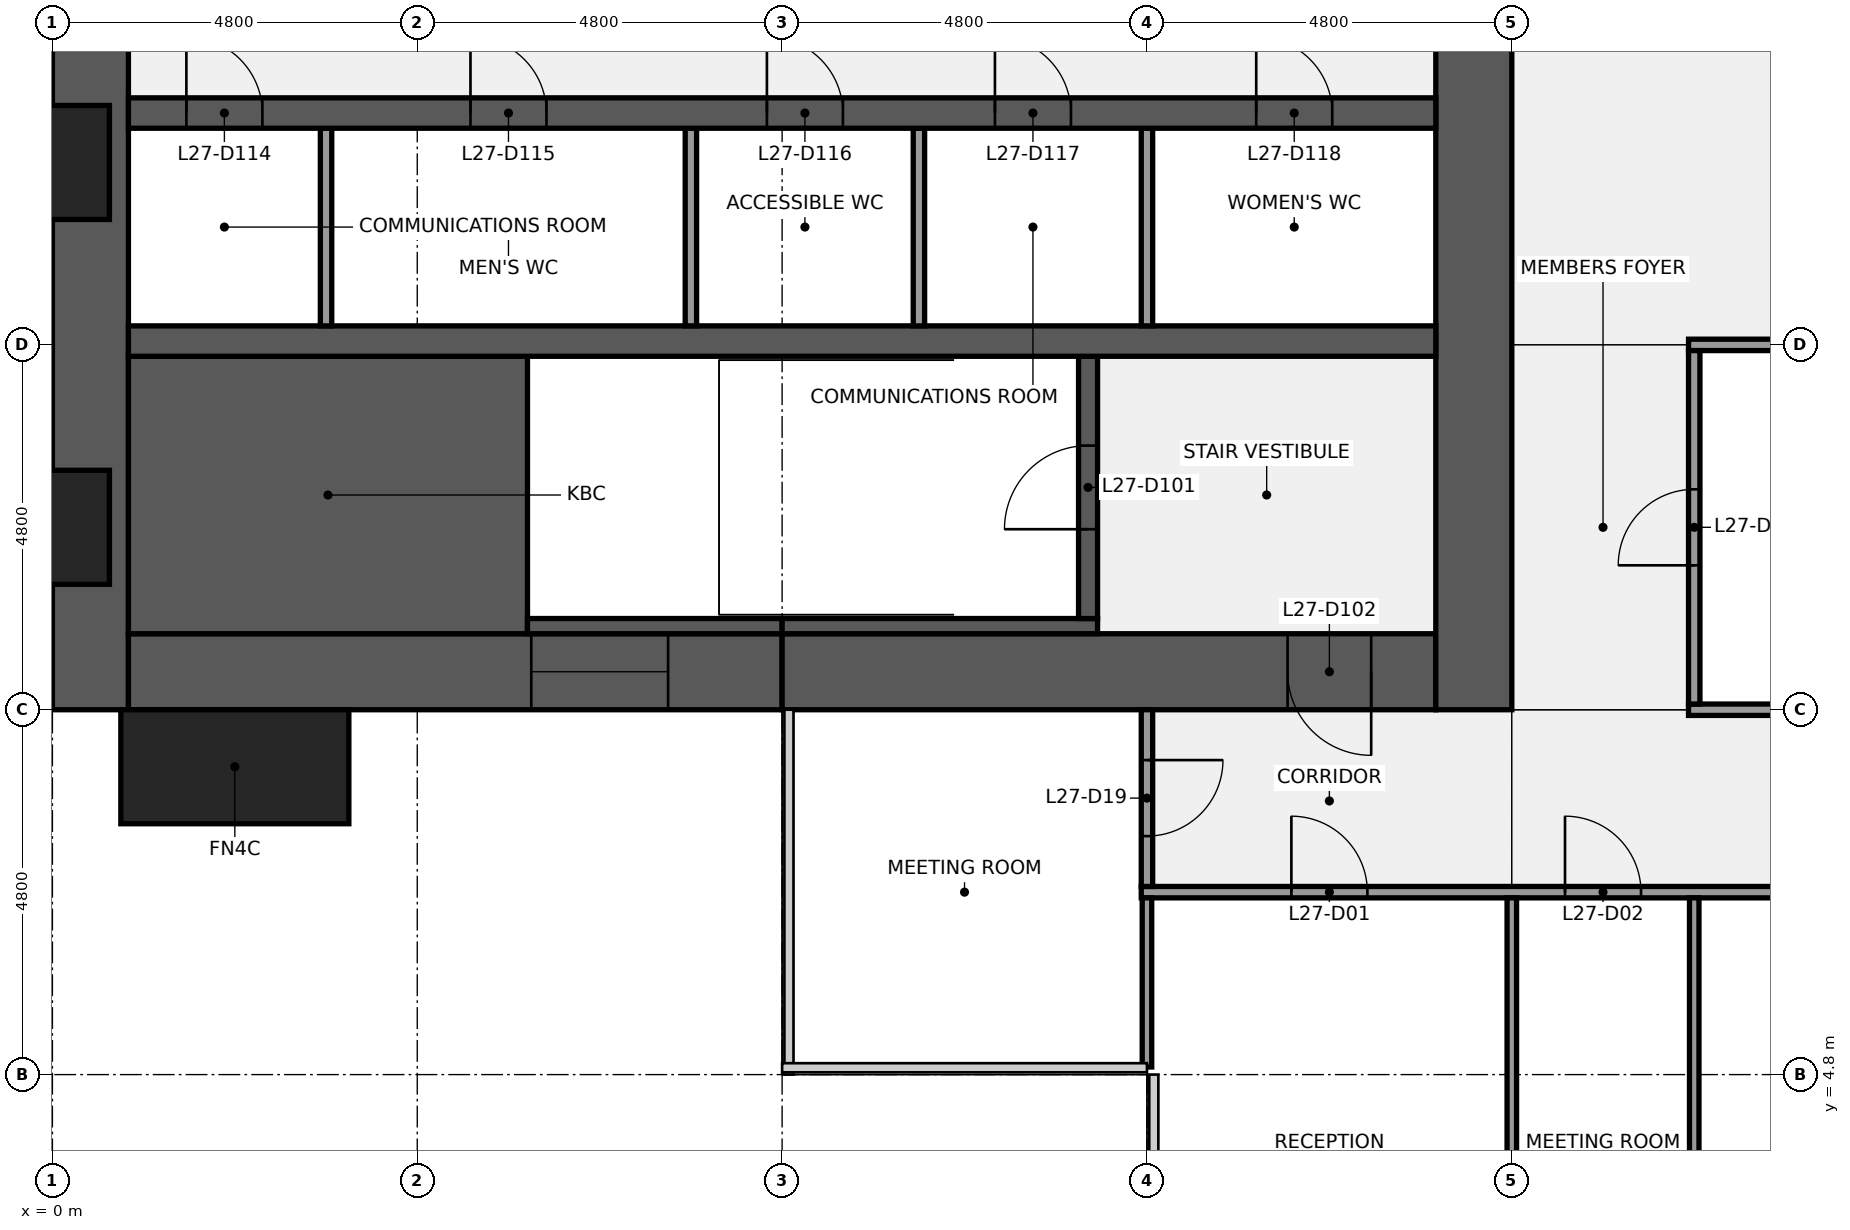
"""IFC4 building model, lengths in metres.
Left out: names, types, materials, properties, quantities, classifications, styles, units other than length and angle.
Written with IfcOpenShell. Run it as: python <this file> out.ifc"""

import sys

from ifc_helpers import new_model, si_unit, direction, frame, frame_2d, origin, origin_2d, place, context, subcontext, project, spatial, rectangle, extrude, element, fill, save


model = new_model("IFC4")
c1 = context("Model", 3, precision=1e-05, world=origin(), true_north=direction((0.0, 1.0)))
c2 = subcontext(c1, "Body", "Model", "MODEL_VIEW")
j1 = project(units=[si_unit("LENGTHUNIT", "METRE"), si_unit("PLANEANGLEUNIT", "RADIAN")], contexts=[c1])
p1 = place(None, origin())
s1 = spatial("IfcSite", under=j1, at=p1, CompositionType="ELEMENT")
p2 = place(p1, origin())
s2 = spatial("IfcBuilding", under=s1, at=p2, CompositionType="ELEMENT")
p3 = place(p2, frame((0.0, 0.0, 128.1)))
s3 = spatial("IfcBuildingStorey", under=s2, at=p3, CompositionType="ELEMENT", Elevation=128.1)
p4 = place(p3, frame((0.5, 9.6, 0.0), z_axis=(0.0, 0.0, 1.0), x_axis=(0.0, 1.0, 0.0)))
e1 = element("IfcWall", 1, at=p4, inside=s3, PredefinedType="SHEAR", context=c2, shape_type="SweptSolid", body=[
    extrude(rectangle(XDim=28.8, YDim=1.0, at=frame_2d((14.4, 0.0))), origin(), (0.0, 0.0, 1.0), 3.84),
])
p5 = place(p4, frame((8.85, 0.0, 0.9)))
e2 = element("IfcOpeningElement", 2, at=p5, cuts=e1, PredefinedType="OPENING", context=c2, shape_type="SweptSolid", body=[
    extrude(rectangle(XDim=1.5, YDim=1.5, at=frame_2d((0.75, 0.75))), frame((0.0, 0.51, 0.0), z_axis=(0.0, -1.0, 0.0), x_axis=(1.0, 0.0, 0.0)), (0.0, 0.0, 1.0), 1.02),
])
p6 = place(p4, frame((18.45, 0.0, 0.9)))
e3 = element("IfcOpeningElement", 3, at=p6, cuts=e1, PredefinedType="OPENING", context=c2, shape_type="SweptSolid", body=[
    extrude(rectangle(XDim=1.5, YDim=1.5, at=frame_2d((0.75, 0.75))), frame((0.0, 0.51, 0.0), z_axis=(0.0, -1.0, 0.0), x_axis=(1.0, 0.0, 0.0)), (0.0, 0.0, 1.0), 1.02),
])
p7 = place(p3, frame((9.6, 10.1, 0.0), z_axis=(0.0, 0.0, 1.0), x_axis=(-1.0, 0.0, 0.0)))
e4 = element("IfcWall", 4, at=p7, inside=s3, PredefinedType="SHEAR", context=c2, shape_type="SweptSolid", body=[
    extrude(rectangle(XDim=8.6, YDim=1.0, at=frame_2d((4.3, 0.0))), origin(), (0.0, 0.0, 1.0), 3.84),
])
p8 = place(p7, frame((1.5, 0.0, 0.9)))
e5 = element("IfcOpeningElement", 5, at=p8, cuts=e4, PredefinedType="OPENING", context=c2, shape_type="SweptSolid", body=[
    extrude(rectangle(XDim=1.8, YDim=1.5, at=frame_2d((0.9, 0.75))), frame((0.0, 0.51, 0.0), z_axis=(0.0, -1.0, 0.0), x_axis=(1.0, 0.0, 0.0)), (0.0, 0.0, 1.0), 1.02),
])
p9 = place(p3, frame((18.2, 10.1, 0.0), z_axis=(0.0, 0.0, 1.0), x_axis=(-1.0, 0.0, 0.0)))
e6 = element("IfcWall", 6, at=p9, inside=s3, PredefinedType="SHEAR", context=c2, shape_type="SweptSolid", body=[
    extrude(rectangle(XDim=8.6, YDim=1.0, at=frame_2d((4.3, 0.0))), origin(), (0.0, 0.0, 1.0), 3.84),
])
p10 = place(p9, frame((0.85, 0.0, 0.0)))
e7 = element("IfcOpeningElement", 7, at=p10, cuts=e6, PredefinedType="OPENING", context=c2, shape_type="SweptSolid", body=[
    extrude(rectangle(XDim=1.1, YDim=2.1, at=frame_2d((0.55, 1.05))), frame((0.0, 0.51, 0.0), z_axis=(0.0, -1.0, 0.0), x_axis=(1.0, 0.0, 0.0)), (0.0, 0.0, 1.0), 1.02),
])
p11 = place(p3, frame((18.7, 38.4, 0.0), z_axis=(0.0, 0.0, 1.0), x_axis=(0.0, -1.0, 0.0)))
e8 = element("IfcWall", 8, at=p11, inside=s3, PredefinedType="SHEAR", context=c2, shape_type="SweptSolid", body=[
    extrude(rectangle(XDim=28.8, YDim=1.0, at=frame_2d((14.4, 0.0))), origin(), (0.0, 0.0, 1.0), 3.84),
])
p12 = place(p11, frame((18.3, 0.0, 0.0)))
e9 = element("IfcOpeningElement", 9, at=p12, cuts=e8, PredefinedType="OPENING", context=c2, shape_type="SweptSolid", body=[
    extrude(rectangle(XDim=1.8, YDim=2.1, at=frame_2d((0.9, 1.05))), frame((0.0, 0.51, 0.0), z_axis=(0.0, -1.0, 0.0), x_axis=(1.0, 0.0, 0.0)), (0.0, 0.0, 1.0), 1.02),
])
p13 = place(p11, frame((8.7, 0.0, 0.0)))
e10 = element("IfcOpeningElement", 10, at=p13, cuts=e8, PredefinedType="OPENING", context=c2, shape_type="SweptSolid", body=[
    extrude(rectangle(XDim=1.8, YDim=2.1, at=frame_2d((0.9, 1.05))), frame((0.0, 0.51, 0.0), z_axis=(0.0, -1.0, 0.0), x_axis=(1.0, 0.0, 0.0)), (0.0, 0.0, 1.0), 1.02),
])
p14 = place(p3, frame((1.0, 12.425, 0.0), z_axis=(0.0, 0.0, 1.0), x_axis=(1.0, 0.0, 0.0)))
e11 = element("IfcWall", 11, at=p14, inside=s3, PredefinedType="SHEAR", context=c2, shape_type="SweptSolid", body=[
    extrude(rectangle(XDim=5.25, YDim=3.65, at=frame_2d((2.625, 0.0))), origin(), (0.0, 0.0, 1.0), 3.84),
])
p15 = place(p3, frame((6.25, 10.7, 0.0), z_axis=(0.0, 0.0, 1.0), x_axis=(1.0, 0.0, 0.0)))
e12 = element("IfcWall", 12, at=p15, inside=s3, PredefinedType="SHEAR", context=c2, shape_type="SweptSolid", body=[
    extrude(rectangle(XDim=3.35, YDim=0.2, at=frame_2d((1.675, 0.0))), origin(), (0.0, 0.0, 1.0), 3.84),
])
p16 = place(p3, frame((9.6, 10.7, 0.0), z_axis=(0.0, 0.0, 1.0), x_axis=(1.0, 0.0, 0.0)))
e13 = element("IfcWall", 13, at=p16, inside=s3, PredefinedType="SHEAR", context=c2, shape_type="SweptSolid", body=[
    extrude(rectangle(XDim=4.15, YDim=0.2, at=frame_2d((2.075, 0.0))), origin(), (0.0, 0.0, 1.0), 3.84),
])
p17 = place(p3, frame((13.625, 10.8, 0.0), z_axis=(0.0, 0.0, 1.0), x_axis=(0.0, 1.0, 0.0)))
e14 = element("IfcWall", 14, at=p17, inside=s3, PredefinedType="SHEAR", context=c2, shape_type="SweptSolid", body=[
    extrude(rectangle(XDim=3.45, YDim=0.25, at=frame_2d((1.725, 0.0))), origin(), (0.0, 0.0, 1.0), 3.84),
])
p18 = place(p17, frame((1.175, 0.0, 0.0)))
e15 = element("IfcOpeningElement", 15, at=p18, cuts=e14, PredefinedType="OPENING", context=c2, shape_type="SweptSolid", body=[
    extrude(rectangle(XDim=1.1, YDim=2.1, at=frame_2d((0.55, 1.05))), frame((0.0, 0.135, 0.0), z_axis=(0.0, -1.0, 0.0), x_axis=(1.0, 0.0, 0.0)), (0.0, 0.0, 1.0), 0.27),
])
p19 = place(p3, frame((1.0, 14.45, 0.0), z_axis=(0.0, 0.0, 1.0), x_axis=(1.0, 0.0, 0.0)))
e16 = element("IfcWall", 16, at=p19, inside=s3, PredefinedType="SHEAR", context=c2, shape_type="SweptSolid", body=[
    extrude(rectangle(XDim=17.2, YDim=0.4, at=frame_2d((8.6, 0.0))), origin(), (0.0, 0.0, 1.0), 3.84),
])
for number, where, z_axis, x_axis in (
    (17, (3.6, 14.65, 0.0), (0.0, 0.0, 1.0), (0.0, 1.0, 0.0)),
    (18, (8.4, 14.65, 0.0), (0.0, 0.0, 1.0), (0.0, 1.0, 0.0)),
    (19, (11.4, 14.65, 0.0), (0.0, 0.0, 1.0), (0.0, 1.0, 0.0)),
    (20, (14.4, 14.65, 0.0), (0.0, 0.0, 1.0), (0.0, 1.0, 0.0)),
):
    element("IfcWall", number, at=place(p3, frame(where, z_axis=z_axis, x_axis=x_axis)), inside=s3, PredefinedType="PARTITIONING", context=c2, shape_type="SweptSolid", body=[
        extrude(rectangle(XDim=2.6, YDim=0.15, at=frame_2d((1.3, 0.0))), origin(), (0.0, 0.0, 1.0), 3.84),
    ])
p20 = place(p3, frame((1.0, 17.45, 0.0), z_axis=(0.0, 0.0, 1.0), x_axis=(1.0, 0.0, 0.0)))
e21 = element("IfcWall", 21, at=p20, inside=s3, PredefinedType="SHEAR", context=c2, shape_type="SweptSolid", body=[
    extrude(rectangle(XDim=17.2, YDim=0.4, at=frame_2d((8.6, 0.0))), origin(), (0.0, 0.0, 1.0), 3.84),
])
p21 = place(p20, frame((0.762, 0.0, 0.0)))
e22 = element("IfcOpeningElement", 22, at=p21, cuts=e21, PredefinedType="OPENING", context=c2, shape_type="SweptSolid", body=[
    extrude(rectangle(XDim=1.0, YDim=2.1, at=frame_2d((0.5, 1.05))), frame((0.0, 0.21, 0.0), z_axis=(0.0, -1.0, 0.0), x_axis=(1.0, 0.0, 0.0)), (0.0, 0.0, 1.0), 0.42),
])
p22 = place(p20, frame((4.5, 0.0, 0.0)))
e23 = element("IfcOpeningElement", 23, at=p22, cuts=e21, PredefinedType="OPENING", context=c2, shape_type="SweptSolid", body=[
    extrude(rectangle(XDim=1.0, YDim=2.1, at=frame_2d((0.5, 1.05))), frame((0.0, 0.21, 0.0), z_axis=(0.0, -1.0, 0.0), x_axis=(1.0, 0.0, 0.0)), (0.0, 0.0, 1.0), 0.42),
])
p23 = place(p20, frame((8.4, 0.0, 0.0)))
e24 = element("IfcOpeningElement", 24, at=p23, cuts=e21, PredefinedType="OPENING", context=c2, shape_type="SweptSolid", body=[
    extrude(rectangle(XDim=1.0, YDim=2.1, at=frame_2d((0.5, 1.05))), frame((0.0, 0.21, 0.0), z_axis=(0.0, -1.0, 0.0), x_axis=(1.0, 0.0, 0.0)), (0.0, 0.0, 1.0), 0.42),
])
p24 = place(p20, frame((11.4, 0.0, 0.0)))
e25 = element("IfcOpeningElement", 25, at=p24, cuts=e21, PredefinedType="OPENING", context=c2, shape_type="SweptSolid", body=[
    extrude(rectangle(XDim=1.0, YDim=2.1, at=frame_2d((0.5, 1.05))), frame((0.0, 0.21, 0.0), z_axis=(0.0, -1.0, 0.0), x_axis=(1.0, 0.0, 0.0)), (0.0, 0.0, 1.0), 0.42),
])
p25 = place(p20, frame((14.837, 0.0, 0.0)))
e26 = element("IfcOpeningElement", 26, at=p25, cuts=e21, PredefinedType="OPENING", context=c2, shape_type="SweptSolid", body=[
    extrude(rectangle(XDim=1.0, YDim=2.1, at=frame_2d((0.5, 1.05))), frame((0.0, 0.21, 0.0), z_axis=(0.0, -1.0, 0.0), x_axis=(1.0, 0.0, 0.0)), (0.0, 0.0, 1.0), 0.42),
])
p26 = place(p3, frame((14.325, 7.2, 0.0), z_axis=(0.0, 0.0, 1.0), x_axis=(1.0, 0.0, 0.0)))
e27 = element("IfcWall", 27, at=p26, inside=s3, PredefinedType="PARTITIONING", context=c2, shape_type="SweptSolid", body=[
    extrude(rectangle(XDim=28.95, YDim=0.15, at=frame_2d((14.475, 0.0))), origin(), (0.0, 0.0, 1.0), 2.936),
])
p27 = place(p26, frame((1.975, 0.0, 0.0)))
e28 = element("IfcOpeningElement", 28, at=p27, cuts=e27, PredefinedType="OPENING", context=c2, shape_type="SweptSolid", body=[
    extrude(rectangle(XDim=1.0, YDim=2.1, at=frame_2d((0.5, 1.05))), frame((0.0, 0.085, 0.0), z_axis=(0.0, -1.0, 0.0), x_axis=(1.0, 0.0, 0.0)), (0.0, 0.0, 1.0), 0.17),
])
p28 = place(p26, frame((5.575, 0.0, 0.0)))
e29 = element("IfcOpeningElement", 29, at=p28, cuts=e27, PredefinedType="OPENING", context=c2, shape_type="SweptSolid", body=[
    extrude(rectangle(XDim=1.0, YDim=2.1, at=frame_2d((0.5, 1.05))), frame((0.0, 0.085, 0.0), z_axis=(0.0, -1.0, 0.0), x_axis=(1.0, 0.0, 0.0)), (0.0, 0.0, 1.0), 0.17),
])
p29 = place(p26, frame((9.175, 0.0, 0.0)))
e30 = element("IfcOpeningElement", 30, at=p29, cuts=e27, PredefinedType="OPENING", context=c2, shape_type="SweptSolid", body=[
    extrude(rectangle(XDim=1.0, YDim=2.1, at=frame_2d((0.5, 1.05))), frame((0.0, 0.085, 0.0), z_axis=(0.0, -1.0, 0.0), x_axis=(1.0, 0.0, 0.0)), (0.0, 0.0, 1.0), 0.17),
])
p30 = place(p26, frame((17.575, 0.0, 0.0)))
e31 = element("IfcOpeningElement", 31, at=p30, cuts=e27, PredefinedType="OPENING", context=c2, shape_type="SweptSolid", body=[
    extrude(rectangle(XDim=1.0, YDim=2.1, at=frame_2d((0.5, 1.05))), frame((0.0, 0.085, 0.0), z_axis=(0.0, -1.0, 0.0), x_axis=(1.0, 0.0, 0.0)), (0.0, 0.0, 1.0), 0.17),
])
p31 = place(p26, frame((25.975, 0.0, 0.0)))
e32 = element("IfcOpeningElement", 32, at=p31, cuts=e27, PredefinedType="OPENING", context=c2, shape_type="SweptSolid", body=[
    extrude(rectangle(XDim=1.0, YDim=2.1, at=frame_2d((0.5, 1.05))), frame((0.0, 0.085, 0.0), z_axis=(0.0, -1.0, 0.0), x_axis=(1.0, 0.0, 0.0)), (0.0, 0.0, 1.0), 0.17),
])
p32 = place(p3, frame((21.525, 9.6, 0.0), z_axis=(0.0, 0.0, 1.0), x_axis=(1.0, 0.0, 0.0)))
e33 = element("IfcWall", 33, at=p32, inside=s3, PredefinedType="PARTITIONING", context=c2, shape_type="SweptSolid", body=[
    extrude(rectangle(XDim=14.55, YDim=0.15, at=frame_2d((7.275, 0.0))), origin(), (0.0, 0.0, 1.0), 2.936),
])
p33 = place(p32, frame((6.775, 0.0, 0.0)))
e34 = element("IfcOpeningElement", 34, at=p33, cuts=e33, PredefinedType="OPENING", context=c2, shape_type="SweptSolid", body=[
    extrude(rectangle(XDim=1.0, YDim=2.1, at=frame_2d((0.5, 1.05))), frame((0.0, 0.085, 0.0), z_axis=(0.0, -1.0, 0.0), x_axis=(1.0, 0.0, 0.0)), (0.0, 0.0, 1.0), 0.17),
])
p34 = place(p32, frame((11.575, 0.0, 0.0)))
e35 = element("IfcOpeningElement", 35, at=p34, cuts=e33, PredefinedType="OPENING", context=c2, shape_type="SweptSolid", body=[
    extrude(rectangle(XDim=1.0, YDim=2.1, at=frame_2d((0.5, 1.05))), frame((0.0, 0.085, 0.0), z_axis=(0.0, -1.0, 0.0), x_axis=(1.0, 0.0, 0.0)), (0.0, 0.0, 1.0), 0.17),
])
p35 = place(p3, frame((21.525, 14.4, 0.0), z_axis=(0.0, 0.0, 1.0), x_axis=(1.0, 0.0, 0.0)))
e36 = element("IfcWall", 36, at=p35, inside=s3, PredefinedType="PARTITIONING", context=c2, shape_type="SweptSolid", body=[
    extrude(rectangle(XDim=4.95, YDim=0.15, at=frame_2d((2.475, 0.0))), origin(), (0.0, 0.0, 1.0), 2.936),
])
p36 = place(p3, frame((14.4, 4.9, 0.0), z_axis=(0.0, 0.0, 1.0), x_axis=(0.0, 1.0, 0.0)))
e37 = element("IfcWall", 37, at=p36, inside=s3, PredefinedType="PARTITIONING", context=c2, shape_type="SweptSolid", body=[
    extrude(rectangle(XDim=2.225, YDim=0.125, at=frame_2d((1.113, 0.0))), origin(), (0.0, 0.0, 1.0), 2.936),
])
p37 = place(p3, frame((14.4, 7.275, 0.0), z_axis=(0.0, 0.0, 1.0), x_axis=(0.0, 1.0, 0.0)))
e38 = element("IfcWall", 38, at=p37, inside=s3, PredefinedType="PARTITIONING", context=c2, shape_type="SweptSolid", body=[
    extrude(rectangle(XDim=2.325, YDim=0.15, at=frame_2d((1.163, 0.0))), origin(), (0.0, 0.0, 1.0), 2.936),
])
p38 = place(p37, frame((0.663, 0.0, 0.0)))
e39 = element("IfcOpeningElement", 39, at=p38, cuts=e38, PredefinedType="OPENING", context=c2, shape_type="SweptSolid", body=[
    extrude(rectangle(XDim=1.0, YDim=2.1, at=frame_2d((0.5, 1.05))), frame((0.0, 0.085, 0.0), z_axis=(0.0, -1.0, 0.0), x_axis=(1.0, 0.0, 0.0)), (0.0, 0.0, 1.0), 0.17),
])
p39 = place(p3, frame((19.2, 0.6, 0.0), z_axis=(0.0, 0.0, 1.0), x_axis=(0.0, 1.0, 0.0)))
e40 = element("IfcWall", 40, at=p39, inside=s3, PredefinedType="PARTITIONING", context=c2, shape_type="SweptSolid", body=[
    extrude(rectangle(XDim=6.525, YDim=0.125, at=frame_2d((3.262, 0.0))), origin(), (0.0, 0.0, 1.0), 2.936),
])
p40 = place(p3, frame((21.6, 0.1, 0.0), z_axis=(0.0, 0.0, 1.0), x_axis=(0.0, 1.0, 0.0)))
e41 = element("IfcWall", 41, at=p40, inside=s3, PredefinedType="PARTITIONING", context=c2, shape_type="SweptSolid", body=[
    extrude(rectangle(XDim=7.025, YDim=0.125, at=frame_2d((3.512, 0.0))), origin(), (0.0, 0.0, 1.0), 2.936),
])
p41 = place(p3, frame((21.6, 9.675, 0.0), z_axis=(0.0, 0.0, 1.0), x_axis=(0.0, 1.0, 0.0)))
e42 = element("IfcWall", 42, at=p41, inside=s3, PredefinedType="PARTITIONING", context=c2, shape_type="SweptSolid", body=[
    extrude(rectangle(XDim=4.65, YDim=0.15, at=frame_2d((2.325, 0.0))), origin(), (0.0, 0.0, 1.0), 2.936),
])
p42 = place(p41, frame((1.825, 0.0, 0.0)))
e43 = element("IfcOpeningElement", 43, at=p42, cuts=e42, PredefinedType="OPENING", context=c2, shape_type="SweptSolid", body=[
    extrude(rectangle(XDim=1.0, YDim=2.1, at=frame_2d((0.5, 1.05))), frame((0.0, 0.085, 0.0), z_axis=(0.0, -1.0, 0.0), x_axis=(1.0, 0.0, 0.0)), (0.0, 0.0, 1.0), 0.17),
])
p43 = place(p3, frame((2.4, 8.85, 0.0), z_axis=(0.0, 0.0, 1.0), x_axis=(1.0, 0.0, 0.0)))
e44 = element("IfcColumn", 44, at=p43, inside=s3, PredefinedType="PILASTER", context=c2, shape_type="SweptSolid", body=[
    extrude(rectangle(XDim=3.0, YDim=1.5, at=origin_2d()), origin(), (0.0, 0.0, 1.0), 4.0),
])
p44 = place(p18, origin())
e45 = element("IfcDoor", 45, at=p44, inside=s3, OperationType="SINGLE_SWING_LEFT", PredefinedType="DOOR", context=c2, shape_type="SweptSolid", body=[
    extrude(rectangle(XDim=1.1, YDim=2.1, at=frame_2d((0.55, 1.05))), frame((0.0, 0.025, 0.0), z_axis=(0.0, -1.0, 0.0), x_axis=(1.0, 0.0, 0.0)), (0.0, 0.0, 1.0), 0.05),
])
fill(e15, e45)
p45 = place(p10, origin())
e46 = element("IfcDoor", 46, at=p45, inside=s3, OperationType="SINGLE_SWING_LEFT", PredefinedType="DOOR", context=c2, shape_type="SweptSolid", body=[
    extrude(rectangle(XDim=1.1, YDim=2.1, at=frame_2d((0.55, 1.05))), frame((0.0, 0.025, 0.0), z_axis=(0.0, -1.0, 0.0), x_axis=(1.0, 0.0, 0.0)), (0.0, 0.0, 1.0), 0.05),
])
fill(e7, e46)
p46 = place(p21, origin())
e47 = element("IfcDoor", 47, at=p46, inside=s3, OperationType="SINGLE_SWING_LEFT", PredefinedType="DOOR", context=c2, shape_type="SweptSolid", body=[
    extrude(rectangle(XDim=1.0, YDim=2.1, at=frame_2d((0.5, 1.05))), frame((0.0, 0.025, 0.0), z_axis=(0.0, -1.0, 0.0), x_axis=(1.0, 0.0, 0.0)), (0.0, 0.0, 1.0), 0.05),
])
fill(e22, e47)
p47 = place(p22, origin())
e48 = element("IfcDoor", 48, at=p47, inside=s3, OperationType="SINGLE_SWING_LEFT", PredefinedType="DOOR", context=c2, shape_type="SweptSolid", body=[
    extrude(rectangle(XDim=1.0, YDim=2.1, at=frame_2d((0.5, 1.05))), frame((0.0, 0.025, 0.0), z_axis=(0.0, -1.0, 0.0), x_axis=(1.0, 0.0, 0.0)), (0.0, 0.0, 1.0), 0.05),
])
fill(e23, e48)
p48 = place(p23, origin())
e49 = element("IfcDoor", 49, at=p48, inside=s3, OperationType="SINGLE_SWING_LEFT", PredefinedType="DOOR", context=c2, shape_type="SweptSolid", body=[
    extrude(rectangle(XDim=1.0, YDim=2.1, at=frame_2d((0.5, 1.05))), frame((0.0, 0.025, 0.0), z_axis=(0.0, -1.0, 0.0), x_axis=(1.0, 0.0, 0.0)), (0.0, 0.0, 1.0), 0.05),
])
fill(e24, e49)
p49 = place(p24, origin())
e50 = element("IfcDoor", 50, at=p49, inside=s3, OperationType="SINGLE_SWING_LEFT", PredefinedType="DOOR", context=c2, shape_type="SweptSolid", body=[
    extrude(rectangle(XDim=1.0, YDim=2.1, at=frame_2d((0.5, 1.05))), frame((0.0, 0.025, 0.0), z_axis=(0.0, -1.0, 0.0), x_axis=(1.0, 0.0, 0.0)), (0.0, 0.0, 1.0), 0.05),
])
fill(e25, e50)
p50 = place(p25, origin())
e51 = element("IfcDoor", 51, at=p50, inside=s3, OperationType="SINGLE_SWING_LEFT", PredefinedType="DOOR", context=c2, shape_type="SweptSolid", body=[
    extrude(rectangle(XDim=1.0, YDim=2.1, at=frame_2d((0.5, 1.05))), frame((0.0, 0.025, 0.0), z_axis=(0.0, -1.0, 0.0), x_axis=(1.0, 0.0, 0.0)), (0.0, 0.0, 1.0), 0.05),
])
fill(e26, e51)
p51 = place(p8, origin())
e52 = element("IfcWindow", 52, at=p51, inside=s3, PartitioningType="SINGLE_PANEL", PredefinedType="WINDOW", context=c2, shape_type="SweptSolid", body=[
    extrude(rectangle(XDim=1.8, YDim=1.5, at=frame_2d((0.9, 0.75))), frame((0.0, 0.03, 0.0), z_axis=(0.0, -1.0, 0.0), x_axis=(1.0, 0.0, 0.0)), (0.0, 0.0, 1.0), 0.06),
])
fill(e5, e52)
p52 = place(p27, origin())
e53 = element("IfcDoor", 53, at=p52, inside=s3, OperationType="SINGLE_SWING_LEFT", PredefinedType="DOOR", context=c2, shape_type="SweptSolid", body=[
    extrude(rectangle(XDim=1.0, YDim=2.1, at=frame_2d((0.5, 1.05))), frame((0.0, 0.025, 0.0), z_axis=(0.0, -1.0, 0.0), x_axis=(1.0, 0.0, 0.0)), (0.0, 0.0, 1.0), 0.05),
])
fill(e28, e53)
p53 = place(p28, origin())
e54 = element("IfcDoor", 54, at=p53, inside=s3, OperationType="SINGLE_SWING_LEFT", PredefinedType="DOOR", context=c2, shape_type="SweptSolid", body=[
    extrude(rectangle(XDim=1.0, YDim=2.1, at=frame_2d((0.5, 1.05))), frame((0.0, 0.025, 0.0), z_axis=(0.0, -1.0, 0.0), x_axis=(1.0, 0.0, 0.0)), (0.0, 0.0, 1.0), 0.05),
])
fill(e29, e54)
p54 = place(p38, origin())
e55 = element("IfcDoor", 55, at=p54, inside=s3, OperationType="SINGLE_SWING_RIGHT", PredefinedType="DOOR", context=c2, shape_type="SweptSolid", body=[
    extrude(rectangle(XDim=1.0, YDim=2.1, at=frame_2d((0.5, 1.05))), frame((0.0, 0.025, 0.0), z_axis=(0.0, -1.0, 0.0), x_axis=(1.0, 0.0, 0.0)), (0.0, 0.0, 1.0), 0.05),
])
fill(e39, e55)
p55 = place(p42, origin())
e56 = element("IfcDoor", 56, at=p55, inside=s3, OperationType="SINGLE_SWING_LEFT", PredefinedType="DOOR", context=c2, shape_type="SweptSolid", body=[
    extrude(rectangle(XDim=1.0, YDim=2.1, at=frame_2d((0.5, 1.05))), frame((0.0, 0.025, 0.0), z_axis=(0.0, -1.0, 0.0), x_axis=(1.0, 0.0, 0.0)), (0.0, 0.0, 1.0), 0.05),
])
fill(e43, e56)
save(model, sys.argv[1])
